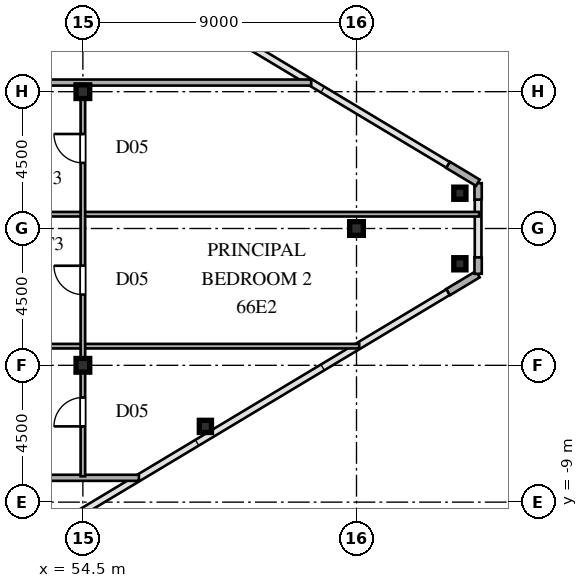
"""IFC4 building model, lengths in metres.
Left out: names, types, materials, properties, quantities, classifications, styles, units other than length and angle.
Written with IfcOpenShell. Run it as: python <this file> out.ifc"""

import sys

from ifc_helpers import new_model, si_unit, direction, frame, frame_2d, origin, origin_2d, place, context, subcontext, project, spatial, rectangle, hollow_rectangle, i_section, extrude, source, transform, mapped, element, fill, save


model = new_model("IFC4")
c1 = context("Model", 3, precision=1e-05, world=origin(), true_north=direction((0.0, 1.0)))
c2 = subcontext(c1, "Body", "Model", "MODEL_VIEW")
j1 = project(units=[si_unit("LENGTHUNIT", "METRE"), si_unit("PLANEANGLEUNIT", "RADIAN")], contexts=[c1])
p1 = place(None, origin())
s1 = spatial("IfcSite", under=j1, at=p1, CompositionType="ELEMENT")
p2 = place(p1, origin())
s2 = spatial("IfcBuilding", under=s1, at=p2, CompositionType="ELEMENT")
p3 = place(p2, frame((0.0, 0.0, 250.65)))
s3 = spatial("IfcBuildingStorey", under=s2, at=p3, CompositionType="ELEMENT", Elevation=250.65)
m1 = source(origin(), c2, "Body", "SweptSolid", [
    extrude(i_section(OverallWidth=0.45, OverallDepth=0.45, WebThickness=0.016, FlangeThickness=0.025, at=origin_2d()), origin(), (0.0, 0.0, 1.0), 3.75),
])
for number, where, z_axis, x_axis in (
    (1, (54.5, -4.5, 0.0), (0.0, 0.0, 1.0), (1.0, 0.0, 0.0)),
    (2, (54.5, 4.5, 0.0), (0.0, 0.0, 1.0), (1.0, 0.0, 0.0)),
    (3, (63.5, 0.0, 0.0), (0.0, 0.0, 1.0), (1.0, 0.0, 0.0)),
):
    element("IfcColumn", number, at=place(p3, frame(where, z_axis=z_axis, x_axis=x_axis)), inside=s3, PredefinedType="COLUMN", context=c2, shape_type="MappedRepresentation", body=[
        mapped(m1, transform((0.0, 0.0, 0.0), scale=1.0)),
    ])
m2 = source(origin(), c2, "Body", "SweptSolid", [
    extrude(hollow_rectangle(XDim=0.4, YDim=0.4, WallThickness=0.016, at=origin_2d()), origin(), (0.0, 0.0, 1.0), 3.75),
])
for number, where, z_axis, x_axis in (
    (4, (66.9, -1.16, 0.0), (0.0, 0.0, 1.0), (1.0, 0.0, 0.0)),
    (5, (66.9, 1.16, 0.0), (0.0, 0.0, 1.0), (1.0, 0.0, 0.0)),
    (6, (58.53, -6.509, 0.0), (0.0, 0.0, 1.0), (1.0, 0.0, 0.0)),
):
    element("IfcColumn", number, at=place(p3, frame(where, z_axis=z_axis, x_axis=x_axis)), inside=s3, PredefinedType="COLUMN", context=c2, shape_type="MappedRepresentation", body=[
        mapped(m2, transform((0.0, 0.0, 0.0), scale=1.0)),
    ])
p4 = place(p3, frame((66.514, -2.092, 0.0), z_axis=(0.0, 0.0, 1.0), x_axis=(0.85743623509, 0.514590228002, 0.0)))
e7 = element("IfcWall", 7, at=p4, inside=s3, PredefinedType="SOLIDWALL", context=c2, shape_type="SweptSolid", body=[
    extrude(rectangle(XDim=1.14, YDim=0.24, at=frame_2d((0.57, 0.0))), origin(), (0.0, 0.0, 1.0), 3.53),
])
for number, where, z_axis, x_axis in (
    (8, (67.5, -1.49, 0.0), (0.0, 0.0, 1.0), (0.0, 1.0, 0.0)),
    (9, (67.5, 0.95, 0.0), (0.0, 0.0, 1.0), (0.0, 1.0, 0.0)),
):
    element("IfcWall", number, at=place(p3, frame(where, z_axis=z_axis, x_axis=x_axis)), inside=s3, PredefinedType="SOLIDWALL", context=c2, shape_type="SweptSolid", body=[
        extrude(rectangle(XDim=0.54, YDim=0.24, at=frame_2d((0.27, 0.0))), origin(), (0.0, 0.0, 1.0), 3.53),
    ])
p5 = place(p3, frame((67.491, 1.505, 0.0), z_axis=(0.0, 0.0, 1.0), x_axis=(-0.85743623509, 0.514590228002, 0.0)))
e10 = element("IfcWall", 10, at=p5, inside=s3, PredefinedType="SOLIDWALL", context=c2, shape_type="SweptSolid", body=[
    extrude(rectangle(XDim=1.14, YDim=0.24, at=frame_2d((0.57, 0.0))), origin(), (0.0, 0.0, 1.0), 3.53),
])
p6 = place(p3, frame((38.53, -8.2, 0.0), z_axis=(0.0, 0.0, 1.0), x_axis=(1.0, 0.0, 0.0)))
e11 = element("IfcWall", 11, at=p6, inside=s3, PredefinedType="PARTITIONING", context=c2, shape_type="SweptSolid", body=[
    extrude(rectangle(XDim=17.813, YDim=0.2, at=frame_2d((8.906, 0.0))), origin(), (0.0, 0.0, 1.0), 3.53),
])
p7 = place(p3, frame((41.35, -3.87, 0.0), z_axis=(0.0, 0.0, 1.0), x_axis=(1.0, 0.0, 0.0)))
e12 = element("IfcWall", 12, at=p7, inside=s3, PredefinedType="PARTITIONING", context=c2, shape_type="SweptSolid", body=[
    extrude(rectangle(XDim=22.24, YDim=0.15, at=frame_2d((11.12, 0.0))), origin(), (0.0, 0.0, 1.0), 3.53),
])
p8 = place(p7, frame((2.775, 0.0, 0.0)))
e13 = element("IfcOpeningElement", 13, at=p8, cuts=e12, PredefinedType="OPENING", context=c2, shape_type="SweptSolid", body=[
    extrude(rectangle(XDim=0.95, YDim=2.15, at=frame_2d((0.475, 1.075))), frame((0.0, 0.085, 0.0), z_axis=(0.0, -1.0, 0.0), x_axis=(1.0, 0.0, 0.0)), (0.0, 0.0, 1.0), 0.17),
])
p9 = place(p3, frame((41.35, 0.47, 0.0), z_axis=(0.0, 0.0, 1.0), x_axis=(1.0, 0.0, 0.0)))
e14 = element("IfcWall", 14, at=p9, inside=s3, PredefinedType="PARTITIONING", context=c2, shape_type="SweptSolid", body=[
    extrude(rectangle(XDim=26.185, YDim=0.15, at=frame_2d((13.092, 0.0))), origin(), (0.0, 0.0, 1.0), 3.53),
])
p10 = place(p9, frame((2.775, 0.0, 0.0)))
e15 = element("IfcOpeningElement", 15, at=p10, cuts=e14, PredefinedType="OPENING", context=c2, shape_type="SweptSolid", body=[
    extrude(rectangle(XDim=0.95, YDim=2.15, at=frame_2d((0.475, 1.075))), frame((0.0, 0.085, 0.0), z_axis=(0.0, -1.0, 0.0), x_axis=(1.0, 0.0, 0.0)), (0.0, 0.0, 1.0), 0.17),
])
p11 = place(p9, frame((9.375, 0.0, 0.0)))
e16 = element("IfcOpeningElement", 16, at=p11, cuts=e14, PredefinedType="OPENING", context=c2, shape_type="SweptSolid", body=[
    extrude(rectangle(XDim=0.95, YDim=2.15, at=frame_2d((0.475, 1.075))), frame((0.0, 0.085, 0.0), z_axis=(0.0, -1.0, 0.0), x_axis=(1.0, 0.0, 0.0)), (0.0, 0.0, 1.0), 0.17),
])
p12 = place(p3, frame((38.53, 4.8, 0.0), z_axis=(0.0, 0.0, 1.0), x_axis=(1.0, 0.0, 0.0)))
e17 = element("IfcWall", 17, at=p12, inside=s3, PredefinedType="PARTITIONING", context=c2, shape_type="SweptSolid", body=[
    extrude(rectangle(XDim=23.48, YDim=0.2, at=frame_2d((11.74, 0.0))), origin(), (0.0, 0.0, 1.0), 3.53),
])
p13 = place(p3, frame((54.5, -8.15, 0.0), z_axis=(0.0, 0.0, 1.0), x_axis=(0.0, 1.0, 0.0)))
e18 = element("IfcWall", 18, at=p13, inside=s3, PredefinedType="PARTITIONING", context=c2, shape_type="SweptSolid", body=[
    extrude(rectangle(XDim=12.9, YDim=0.15, at=frame_2d((6.45, 0.0))), origin(), (0.0, 0.0, 1.0), 2.93),
])
p14 = place(p13, frame((5.975, 0.0, 0.0)))
e19 = element("IfcOpeningElement", 19, at=p14, cuts=e18, PredefinedType="OPENING", context=c2, shape_type="SweptSolid", body=[
    extrude(rectangle(XDim=0.95, YDim=2.15, at=frame_2d((0.475, 1.075))), frame((0.0, 0.085, 0.0), z_axis=(0.0, -1.0, 0.0), x_axis=(1.0, 0.0, 0.0)), (0.0, 0.0, 1.0), 0.17),
])
p15 = place(p13, frame((1.642, 0.0, 0.0)))
e20 = element("IfcOpeningElement", 20, at=p15, cuts=e18, PredefinedType="OPENING", context=c2, shape_type="SweptSolid", body=[
    extrude(rectangle(XDim=0.95, YDim=2.15, at=frame_2d((0.475, 1.075))), frame((0.0, 0.085, 0.0), z_axis=(0.0, -1.0, 0.0), x_axis=(1.0, 0.0, 0.0)), (0.0, 0.0, 1.0), 0.17),
])
p16 = place(p13, frame((10.308, 0.0, 0.0)))
e21 = element("IfcOpeningElement", 21, at=p16, cuts=e18, PredefinedType="OPENING", context=c2, shape_type="SweptSolid", body=[
    extrude(rectangle(XDim=0.95, YDim=2.15, at=frame_2d((0.475, 1.075))), frame((0.0, 0.085, 0.0), z_axis=(0.0, -1.0, 0.0), x_axis=(1.0, 0.0, 0.0)), (0.0, 0.0, 1.0), 0.17),
])
m3 = source(origin(), c2, "Body", "SweptSolid", [
    extrude(rectangle(XDim=0.95, YDim=2.15, at=frame_2d((0.475, 1.075))), frame((0.0, 0.025, 0.0), z_axis=(0.0, -1.0, 0.0), x_axis=(1.0, 0.0, 0.0)), (0.0, 0.0, 1.0), 0.05),
])
p17 = place(p14, origin())
e22 = element("IfcDoor", 22, at=p17, inside=s3, OperationType="SINGLE_SWING_RIGHT", PredefinedType="DOOR", context=c2, shape_type="MappedRepresentation", body=[
    mapped(m3, transform((0.0, 0.0, 0.0), scale=1.0)),
])
fill(e19, e22)
p18 = place(p15, origin())
e23 = element("IfcDoor", 23, at=p18, inside=s3, OperationType="SINGLE_SWING_LEFT", PredefinedType="DOOR", context=c2, shape_type="MappedRepresentation", body=[
    mapped(m3, transform((0.0, 0.0, 0.0), scale=1.0)),
])
fill(e20, e23)
p19 = place(p16, origin())
e24 = element("IfcDoor", 24, at=p19, inside=s3, OperationType="SINGLE_SWING_RIGHT", PredefinedType="DOOR", context=c2, shape_type="MappedRepresentation", body=[
    mapped(m3, transform((0.0, 0.0, 0.0), scale=1.0)),
])
fill(e21, e24)
save(model, sys.argv[1])
